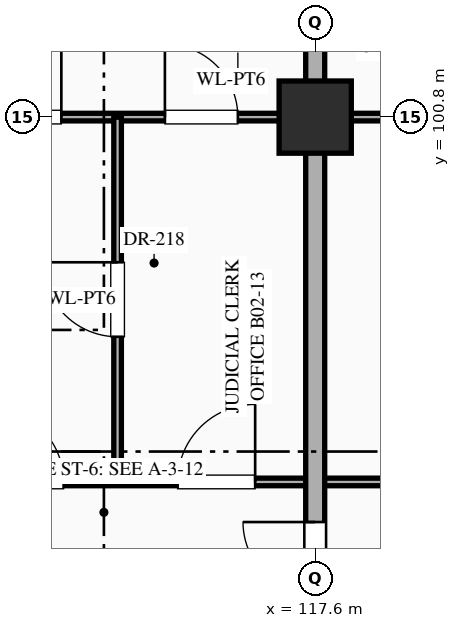
"""IFC4 building model, lengths in metres.
Left out: names, types, materials, properties, quantities, classifications, styles, units other than length and angle.
Written with IfcOpenShell. Run it as: python <this file> out.ifc"""

import sys

from ifc_helpers import new_model, si_unit, direction, frame, frame_2d, origin, origin_2d, place, context, subcontext, project, spatial, rectangle, extrude, element, fill, save


model = new_model("IFC4")
c1 = context("Model", 3, precision=1e-05, world=origin(), true_north=direction((0.0, 1.0)))
c2 = subcontext(c1, "Body", "Model", "MODEL_VIEW")
j1 = project(units=[si_unit("LENGTHUNIT", "METRE"), si_unit("PLANEANGLEUNIT", "RADIAN")], contexts=[c1])
p1 = place(None, origin())
s1 = spatial("IfcSite", under=j1, at=p1, CompositionType="ELEMENT")
p2 = place(p1, origin())
s2 = spatial("IfcBuilding", under=s1, at=p2, CompositionType="ELEMENT")
p3 = place(p2, frame((0.0, 0.0, -10.2)))
s3 = spatial("IfcBuildingStorey", under=s2, at=p3, CompositionType="ELEMENT", Elevation=-10.2)
p4 = place(p3, frame((117.6, 100.8, 0.0), z_axis=(0.0, 0.0, 1.0), x_axis=(1.0, 0.0, 0.0)))
e1 = element("IfcColumn", 1, at=p4, inside=s3, PredefinedType="COLUMN", context=c2, shape_type="SweptSolid", body=[
    extrude(rectangle(XDim=0.95, YDim=0.95, at=origin_2d()), origin(), (0.0, 0.0, 1.0), 4.8),
])
p5 = place(p3, frame((0.04, 96.0, 0.0), z_axis=(0.0, 0.0, 1.0), x_axis=(1.0, 0.0, 0.0)))
e2 = element("IfcWall", 2, at=p5, inside=s3, PredefinedType="STANDARD", context=c2, shape_type="SweptSolid", body=[
    extrude(rectangle(XDim=151.16, YDim=0.1, at=frame_2d((75.58, 0.0))), origin(), (0.0, 0.0, 1.0), 4.48),
])
p6 = place(p5, frame((1.04, 0.0, 0.0)))
e3 = element("IfcOpeningElement", 3, at=p6, cuts=e2, PredefinedType="OPENING", context=c2, shape_type="SweptSolid", body=[
    extrude(rectangle(XDim=1.28, YDim=2.35, at=frame_2d((0.64, 1.175))), frame((0.0, 0.062, 0.0), z_axis=(0.0, -1.0, 0.0), x_axis=(1.0, 0.0, 0.0)), (0.0, 0.0, 1.0), 0.124),
])
p7 = place(p5, frame((4.09, 0.0, 0.0)))
e4 = element("IfcOpeningElement", 4, at=p7, cuts=e2, PredefinedType="OPENING", context=c2, shape_type="SweptSolid", body=[
    extrude(rectangle(XDim=0.94, YDim=2.3, at=frame_2d((0.47, 1.15))), frame((0.0, 0.062, 0.0), z_axis=(0.0, -1.0, 0.0), x_axis=(1.0, 0.0, 0.0)), (0.0, 0.0, 1.0), 0.124),
])
p8 = place(p5, frame((6.57, 0.0, 0.0)))
e5 = element("IfcOpeningElement", 5, at=p8, cuts=e2, PredefinedType="OPENING", context=c2, shape_type="SweptSolid", body=[
    extrude(rectangle(XDim=0.98, YDim=2.35, at=frame_2d((0.49, 1.175))), frame((0.0, 0.062, 0.0), z_axis=(0.0, -1.0, 0.0), x_axis=(1.0, 0.0, 0.0)), (0.0, 0.0, 1.0), 0.124),
])
p9 = place(p5, frame((12.05, 0.0, 0.0)))
e6 = element("IfcOpeningElement", 6, at=p9, cuts=e2, PredefinedType="OPENING", context=c2, shape_type="SweptSolid", body=[
    extrude(rectangle(XDim=1.02, YDim=2.4, at=frame_2d((0.51, 1.2))), frame((0.0, 0.062, 0.0), z_axis=(0.0, -1.0, 0.0), x_axis=(1.0, 0.0, 0.0)), (0.0, 0.0, 1.0), 0.124),
])
p10 = place(p5, frame((20.43, 0.0, 0.0)))
e7 = element("IfcOpeningElement", 7, at=p10, cuts=e2, PredefinedType="OPENING", context=c2, shape_type="SweptSolid", body=[
    extrude(rectangle(XDim=1.06, YDim=2.4, at=frame_2d((0.53, 1.2))), frame((0.0, 0.062, 0.0), z_axis=(0.0, -1.0, 0.0), x_axis=(1.0, 0.0, 0.0)), (0.0, 0.0, 1.0), 0.124),
])
p11 = place(p5, frame((26.29, 0.0, 0.0)))
e8 = element("IfcOpeningElement", 8, at=p11, cuts=e2, PredefinedType="OPENING", context=c2, shape_type="SweptSolid", body=[
    extrude(rectangle(XDim=1.14, YDim=2.4, at=frame_2d((0.57, 1.2))), frame((0.0, 0.062, 0.0), z_axis=(0.0, -1.0, 0.0), x_axis=(1.0, 0.0, 0.0)), (0.0, 0.0, 1.0), 0.124),
])
p12 = place(p5, frame((29.31, 0.0, 0.0)))
e9 = element("IfcOpeningElement", 9, at=p12, cuts=e2, PredefinedType="OPENING", context=c2, shape_type="SweptSolid", body=[
    extrude(rectangle(XDim=0.9, YDim=2.15, at=frame_2d((0.45, 1.075))), frame((0.0, 0.062, 0.0), z_axis=(0.0, -1.0, 0.0), x_axis=(1.0, 0.0, 0.0)), (0.0, 0.0, 1.0), 0.124),
])
p13 = place(p5, frame((31.83, 0.0, 0.0)))
e10 = element("IfcOpeningElement", 10, at=p13, cuts=e2, PredefinedType="OPENING", context=c2, shape_type="SweptSolid", body=[
    extrude(rectangle(XDim=0.86, YDim=2.1, at=frame_2d((0.43, 1.05))), frame((0.0, 0.062, 0.0), z_axis=(0.0, -1.0, 0.0), x_axis=(1.0, 0.0, 0.0)), (0.0, 0.0, 1.0), 0.124),
])
p14 = place(p5, frame((37.3, 0.0, 0.0)))
e11 = element("IfcOpeningElement", 11, at=p14, cuts=e2, PredefinedType="OPENING", context=c2, shape_type="SweptSolid", body=[
    extrude(rectangle(XDim=0.92, YDim=2.15, at=frame_2d((0.46, 1.075))), frame((0.0, 0.062, 0.0), z_axis=(0.0, -1.0, 0.0), x_axis=(1.0, 0.0, 0.0)), (0.0, 0.0, 1.0), 0.124),
])
p15 = place(p5, frame((45.68, 0.0, 0.0)))
e12 = element("IfcOpeningElement", 12, at=p15, cuts=e2, PredefinedType="OPENING", context=c2, shape_type="SweptSolid", body=[
    extrude(rectangle(XDim=0.96, YDim=2.2, at=frame_2d((0.48, 1.1))), frame((0.0, 0.062, 0.0), z_axis=(0.0, -1.0, 0.0), x_axis=(1.0, 0.0, 0.0)), (0.0, 0.0, 1.0), 0.124),
])
p16 = place(p5, frame((51.57, 0.0, 0.0)))
e13 = element("IfcOpeningElement", 13, at=p16, cuts=e2, PredefinedType="OPENING", context=c2, shape_type="SweptSolid", body=[
    extrude(rectangle(XDim=0.98, YDim=2.35, at=frame_2d((0.49, 1.175))), frame((0.0, 0.062, 0.0), z_axis=(0.0, -1.0, 0.0), x_axis=(1.0, 0.0, 0.0)), (0.0, 0.0, 1.0), 0.124),
])
p17 = place(p5, frame((54.45, 0.0, 0.0)))
e14 = element("IfcOpeningElement", 14, at=p17, cuts=e2, PredefinedType="OPENING", context=c2, shape_type="SweptSolid", body=[
    extrude(rectangle(XDim=1.02, YDim=2.4, at=frame_2d((0.51, 1.2))), frame((0.0, 0.062, 0.0), z_axis=(0.0, -1.0, 0.0), x_axis=(1.0, 0.0, 0.0)), (0.0, 0.0, 1.0), 0.124),
])
p18 = place(p5, frame((56.93, 0.0, 0.0)))
e15 = element("IfcOpeningElement", 15, at=p18, cuts=e2, PredefinedType="OPENING", context=c2, shape_type="SweptSolid", body=[
    extrude(rectangle(XDim=1.06, YDim=2.4, at=frame_2d((0.53, 1.2))), frame((0.0, 0.062, 0.0), z_axis=(0.0, -1.0, 0.0), x_axis=(1.0, 0.0, 0.0)), (0.0, 0.0, 1.0), 0.124),
])
p19 = place(p5, frame((62.39, 0.0, 0.0)))
e16 = element("IfcOpeningElement", 16, at=p19, cuts=e2, PredefinedType="OPENING", context=c2, shape_type="SweptSolid", body=[
    extrude(rectangle(XDim=1.14, YDim=2.4, at=frame_2d((0.57, 1.2))), frame((0.0, 0.062, 0.0), z_axis=(0.0, -1.0, 0.0), x_axis=(1.0, 0.0, 0.0)), (0.0, 0.0, 1.0), 0.124),
])
p20 = place(p5, frame((70.91, 0.0, 0.0)))
e17 = element("IfcOpeningElement", 17, at=p20, cuts=e2, PredefinedType="OPENING", context=c2, shape_type="SweptSolid", body=[
    extrude(rectangle(XDim=0.9, YDim=2.15, at=frame_2d((0.45, 1.075))), frame((0.0, 0.062, 0.0), z_axis=(0.0, -1.0, 0.0), x_axis=(1.0, 0.0, 0.0)), (0.0, 0.0, 1.0), 0.124),
])
p21 = place(p5, frame((79.33, 0.0, 0.0)))
e18 = element("IfcOpeningElement", 18, at=p21, cuts=e2, PredefinedType="OPENING", context=c2, shape_type="SweptSolid", body=[
    extrude(rectangle(XDim=0.86, YDim=2.1, at=frame_2d((0.43, 1.05))), frame((0.0, 0.062, 0.0), z_axis=(0.0, -1.0, 0.0), x_axis=(1.0, 0.0, 0.0)), (0.0, 0.0, 1.0), 0.124),
])
p22 = place(p5, frame((85.1, 0.0, 0.0)))
e19 = element("IfcOpeningElement", 19, at=p22, cuts=e2, PredefinedType="OPENING", context=c2, shape_type="SweptSolid", body=[
    extrude(rectangle(XDim=1.12, YDim=2.25, at=frame_2d((0.56, 1.125))), frame((0.0, 0.062, 0.0), z_axis=(0.0, -1.0, 0.0), x_axis=(1.0, 0.0, 0.0)), (0.0, 0.0, 1.0), 0.124),
])
p23 = place(p5, frame((87.98, 0.0, 0.0)))
e20 = element("IfcOpeningElement", 20, at=p23, cuts=e2, PredefinedType="OPENING", context=c2, shape_type="SweptSolid", body=[
    extrude(rectangle(XDim=1.16, YDim=2.3, at=frame_2d((0.58, 1.15))), frame((0.0, 0.062, 0.0), z_axis=(0.0, -1.0, 0.0), x_axis=(1.0, 0.0, 0.0)), (0.0, 0.0, 1.0), 0.124),
])
p24 = place(p5, frame((90.46, 0.0, 0.0)))
e21 = element("IfcOpeningElement", 21, at=p24, cuts=e2, PredefinedType="OPENING", context=c2, shape_type="SweptSolid", body=[
    extrude(rectangle(XDim=1.2, YDim=2.35, at=frame_2d((0.6, 1.175))), frame((0.0, 0.062, 0.0), z_axis=(0.0, -1.0, 0.0), x_axis=(1.0, 0.0, 0.0)), (0.0, 0.0, 1.0), 0.124),
])
p25 = place(p5, frame((95.94, 0.0, 0.0)))
e22 = element("IfcOpeningElement", 22, at=p25, cuts=e2, PredefinedType="OPENING", context=c2, shape_type="SweptSolid", body=[
    extrude(rectangle(XDim=1.24, YDim=2.3, at=frame_2d((0.62, 1.15))), frame((0.0, 0.062, 0.0), z_axis=(0.0, -1.0, 0.0), x_axis=(1.0, 0.0, 0.0)), (0.0, 0.0, 1.0), 0.124),
])
p26 = place(p5, frame((104.32, 0.0, 0.0)))
e23 = element("IfcOpeningElement", 23, at=p26, cuts=e2, PredefinedType="OPENING", context=c2, shape_type="SweptSolid", body=[
    extrude(rectangle(XDim=1.28, YDim=2.35, at=frame_2d((0.64, 1.175))), frame((0.0, 0.062, 0.0), z_axis=(0.0, -1.0, 0.0), x_axis=(1.0, 0.0, 0.0)), (0.0, 0.0, 1.0), 0.124),
])
p27 = place(p5, frame((110.39, 0.0, 0.0)))
e24 = element("IfcOpeningElement", 24, at=p27, cuts=e2, PredefinedType="OPENING", context=c2, shape_type="SweptSolid", body=[
    extrude(rectangle(XDim=0.94, YDim=2.3, at=frame_2d((0.47, 1.15))), frame((0.0, 0.062, 0.0), z_axis=(0.0, -1.0, 0.0), x_axis=(1.0, 0.0, 0.0)), (0.0, 0.0, 1.0), 0.124),
])
p28 = place(p5, frame((113.27, 0.0, 0.0)))
e25 = element("IfcOpeningElement", 25, at=p28, cuts=e2, PredefinedType="OPENING", context=c2, shape_type="SweptSolid", body=[
    extrude(rectangle(XDim=0.98, YDim=2.35, at=frame_2d((0.49, 1.175))), frame((0.0, 0.062, 0.0), z_axis=(0.0, -1.0, 0.0), x_axis=(1.0, 0.0, 0.0)), (0.0, 0.0, 1.0), 0.124),
])
p29 = place(p5, frame((115.75, 0.0, 0.0)))
e26 = element("IfcOpeningElement", 26, at=p29, cuts=e2, PredefinedType="OPENING", context=c2, shape_type="SweptSolid", body=[
    extrude(rectangle(XDim=1.02, YDim=2.4, at=frame_2d((0.51, 1.2))), frame((0.0, 0.062, 0.0), z_axis=(0.0, -1.0, 0.0), x_axis=(1.0, 0.0, 0.0)), (0.0, 0.0, 1.0), 0.124),
])
p30 = place(p5, frame((121.24, 0.0, 0.0)))
e27 = element("IfcOpeningElement", 27, at=p30, cuts=e2, PredefinedType="OPENING", context=c2, shape_type="SweptSolid", body=[
    extrude(rectangle(XDim=1.04, YDim=2.2, at=frame_2d((0.52, 1.1))), frame((0.0, 0.062, 0.0), z_axis=(0.0, -1.0, 0.0), x_axis=(1.0, 0.0, 0.0)), (0.0, 0.0, 1.0), 0.124),
])
p31 = place(p5, frame((129.62, 0.0, 0.0)))
e28 = element("IfcOpeningElement", 28, at=p31, cuts=e2, PredefinedType="OPENING", context=c2, shape_type="SweptSolid", body=[
    extrude(rectangle(XDim=1.08, YDim=2.25, at=frame_2d((0.54, 1.125))), frame((0.0, 0.062, 0.0), z_axis=(0.0, -1.0, 0.0), x_axis=(1.0, 0.0, 0.0)), (0.0, 0.0, 1.0), 0.124),
])
p32 = place(p5, frame((135.5, 0.0, 0.0)))
e29 = element("IfcOpeningElement", 29, at=p32, cuts=e2, PredefinedType="OPENING", context=c2, shape_type="SweptSolid", body=[
    extrude(rectangle(XDim=1.12, YDim=2.25, at=frame_2d((0.56, 1.125))), frame((0.0, 0.062, 0.0), z_axis=(0.0, -1.0, 0.0), x_axis=(1.0, 0.0, 0.0)), (0.0, 0.0, 1.0), 0.124),
])
p33 = place(p5, frame((138.38, 0.0, 0.0)))
e30 = element("IfcOpeningElement", 30, at=p33, cuts=e2, PredefinedType="OPENING", context=c2, shape_type="SweptSolid", body=[
    extrude(rectangle(XDim=1.16, YDim=2.3, at=frame_2d((0.58, 1.15))), frame((0.0, 0.062, 0.0), z_axis=(0.0, -1.0, 0.0), x_axis=(1.0, 0.0, 0.0)), (0.0, 0.0, 1.0), 0.124),
])
p34 = place(p5, frame((140.86, 0.0, 0.0)))
e31 = element("IfcOpeningElement", 31, at=p34, cuts=e2, PredefinedType="OPENING", context=c2, shape_type="SweptSolid", body=[
    extrude(rectangle(XDim=1.2, YDim=2.35, at=frame_2d((0.6, 1.175))), frame((0.0, 0.062, 0.0), z_axis=(0.0, -1.0, 0.0), x_axis=(1.0, 0.0, 0.0)), (0.0, 0.0, 1.0), 0.124),
])
p35 = place(p5, frame((146.34, 0.0, 0.0)))
e32 = element("IfcOpeningElement", 32, at=p35, cuts=e2, PredefinedType="OPENING", context=c2, shape_type="SweptSolid", body=[
    extrude(rectangle(XDim=1.24, YDim=2.3, at=frame_2d((0.62, 1.15))), frame((0.0, 0.062, 0.0), z_axis=(0.0, -1.0, 0.0), x_axis=(1.0, 0.0, 0.0)), (0.0, 0.0, 1.0), 0.124),
])
p36 = place(p3, frame((109.2, 100.8, 0.0), z_axis=(0.0, 0.0, 1.0), x_axis=(1.0, 0.0, 0.0)))
e33 = element("IfcWall", 33, at=p36, inside=s3, PredefinedType="STANDARD", context=c2, shape_type="SweptSolid", body=[
    extrude(rectangle(XDim=12.6, YDim=0.1, at=frame_2d((6.3, 0.0))), origin(), (0.0, 0.0, 1.0), 3.63),
])
p37 = place(p36, frame((10.228, 0.0, 0.0)))
e34 = element("IfcOpeningElement", 34, at=p37, cuts=e33, PredefinedType="OPENING", context=c2, shape_type="SweptSolid", body=[
    extrude(rectangle(XDim=0.94, YDim=2.3, at=frame_2d((0.47, 1.15))), frame((0.0, 0.062, 0.0), z_axis=(0.0, -1.0, 0.0), x_axis=(1.0, 0.0, 0.0)), (0.0, 0.0, 1.0), 0.124),
])
p38 = place(p36, frame((1.468, 0.0, 0.0)))
e35 = element("IfcOpeningElement", 35, at=p38, cuts=e33, PredefinedType="OPENING", context=c2, shape_type="SweptSolid", body=[
    extrude(rectangle(XDim=0.86, YDim=2.1, at=frame_2d((0.43, 1.05))), frame((0.0, 0.062, 0.0), z_axis=(0.0, -1.0, 0.0), x_axis=(1.0, 0.0, 0.0)), (0.0, 0.0, 1.0), 0.124),
])
p39 = place(p36, frame((4.14, 0.0, 0.0)))
e36 = element("IfcOpeningElement", 36, at=p39, cuts=e33, PredefinedType="OPENING", context=c2, shape_type="SweptSolid", body=[
    extrude(rectangle(XDim=0.92, YDim=2.15, at=frame_2d((0.46, 1.075))), frame((0.0, 0.062, 0.0), z_axis=(0.0, -1.0, 0.0), x_axis=(1.0, 0.0, 0.0)), (0.0, 0.0, 1.0), 0.124),
])
p40 = place(p36, frame((6.423, 0.0, 0.0)))
e37 = element("IfcOpeningElement", 37, at=p40, cuts=e33, PredefinedType="OPENING", context=c2, shape_type="SweptSolid", body=[
    extrude(rectangle(XDim=0.96, YDim=2.2, at=frame_2d((0.48, 1.1))), frame((0.0, 0.062, 0.0), z_axis=(0.0, -1.0, 0.0), x_axis=(1.0, 0.0, 0.0)), (0.0, 0.0, 1.0), 0.124),
])
p41 = place(p3, frame((115.0, 96.0, 0.0), z_axis=(0.0, 0.0, 1.0), x_axis=(0.0, 1.0, 0.0)))
e38 = element("IfcWall", 38, at=p41, inside=s3, PredefinedType="STANDARD", context=c2, shape_type="SweptSolid", body=[
    extrude(rectangle(XDim=4.8, YDim=0.1, at=frame_2d((2.4, 0.0))), origin(), (0.0, 0.0, 1.0), 4.48),
])
p42 = place(p41, frame((1.91, 0.0, 0.0)))
e39 = element("IfcOpeningElement", 39, at=p42, cuts=e38, PredefinedType="OPENING", context=c2, shape_type="SweptSolid", body=[
    extrude(rectangle(XDim=0.98, YDim=2.35, at=frame_2d((0.49, 1.175))), frame((0.0, 0.062, 0.0), z_axis=(0.0, -1.0, 0.0), x_axis=(1.0, 0.0, 0.0)), (0.0, 0.0, 1.0), 0.124),
])
p43 = place(p3, frame((117.6, 91.2, 0.0), z_axis=(0.0, 0.0, 1.0), x_axis=(0.0, 1.0, 0.0)))
e40 = element("IfcWall", 40, at=p43, inside=s3, PredefinedType="STANDARD", context=c2, shape_type="SweptSolid", body=[
    extrude(rectangle(XDim=23.96, YDim=0.25, at=frame_2d((11.98, 0.0))), origin(), (0.0, 0.0, 1.0), 3.73),
])
p44 = place(p43, frame((0.452, 0.0, 0.0)))
e41 = element("IfcOpeningElement", 41, at=p44, cuts=e40, PredefinedType="OPENING", context=c2, shape_type="SweptSolid", body=[
    extrude(rectangle(XDim=1.1, YDim=2.2, at=frame_2d((0.55, 1.1))), frame((0.0, 0.137, 0.0), z_axis=(0.0, -1.0, 0.0), x_axis=(1.0, 0.0, 0.0)), (0.0, 0.0, 1.0), 0.274),
])
p45 = place(p43, frame((10.498, 0.0, 0.0)))
e42 = element("IfcOpeningElement", 42, at=p45, cuts=e40, PredefinedType="OPENING", context=c2, shape_type="SweptSolid", body=[
    extrude(rectangle(XDim=1.0, YDim=2.2, at=frame_2d((0.5, 1.1))), frame((0.0, 0.137, 0.0), z_axis=(0.0, -1.0, 0.0), x_axis=(1.0, 0.0, 0.0)), (0.0, 0.0, 1.0), 0.274),
])
p46 = place(p43, frame((3.323, 0.0, 0.0)))
e43 = element("IfcOpeningElement", 43, at=p46, cuts=e40, PredefinedType="OPENING", context=c2, shape_type="SweptSolid", body=[
    extrude(rectangle(XDim=0.95, YDim=2.15, at=frame_2d((0.475, 1.075))), frame((0.0, 0.137, 0.0), z_axis=(0.0, -1.0, 0.0), x_axis=(1.0, 0.0, 0.0)), (0.0, 0.0, 1.0), 0.274),
])
p47 = place(p43, frame((17.698, 0.0, 0.0)))
e44 = element("IfcOpeningElement", 44, at=p47, cuts=e40, PredefinedType="OPENING", context=c2, shape_type="SweptSolid", body=[
    extrude(rectangle(XDim=1.0, YDim=2.2, at=frame_2d((0.5, 1.1))), frame((0.0, 0.137, 0.0), z_axis=(0.0, -1.0, 0.0), x_axis=(1.0, 0.0, 0.0)), (0.0, 0.0, 1.0), 0.274),
])
p48 = place(p39, origin())
e45 = element("IfcDoor", 45, at=p48, inside=s3, OperationType="SINGLE_SWING_RIGHT", PredefinedType="DOOR", context=c2, shape_type="SweptSolid", body=[
    extrude(rectangle(XDim=0.92, YDim=2.15, at=frame_2d((0.46, 1.075))), frame((0.0, 0.025, 0.0), z_axis=(0.0, -1.0, 0.0), x_axis=(1.0, 0.0, 0.0)), (0.0, 0.0, 1.0), 0.05),
])
fill(e36, e45)
p49 = place(p40, origin())
e46 = element("IfcDoor", 46, at=p49, inside=s3, OperationType="SINGLE_SWING_LEFT", PredefinedType="DOOR", context=c2, shape_type="SweptSolid", body=[
    extrude(rectangle(XDim=0.96, YDim=2.2, at=frame_2d((0.48, 1.1))), frame((0.0, 0.025, 0.0), z_axis=(0.0, -1.0, 0.0), x_axis=(1.0, 0.0, 0.0)), (0.0, 0.0, 1.0), 0.05),
])
fill(e37, e46)
p50 = place(p46, origin())
e47 = element("IfcDoor", 47, at=p50, inside=s3, OperationType="SINGLE_SWING_RIGHT", PredefinedType="DOOR", context=c2, shape_type="SweptSolid", body=[
    extrude(rectangle(XDim=0.95, YDim=2.15, at=frame_2d((0.475, 1.075))), frame((0.0, 0.025, 0.0), z_axis=(0.0, -1.0, 0.0), x_axis=(1.0, 0.0, 0.0)), (0.0, 0.0, 1.0), 0.05),
])
fill(e43, e47)
p51 = place(p28, origin())
e48 = element("IfcDoor", 48, at=p51, inside=s3, OperationType="SINGLE_SWING_LEFT", PredefinedType="DOOR", context=c2, shape_type="SweptSolid", body=[
    extrude(rectangle(XDim=0.98, YDim=2.35, at=frame_2d((0.49, 1.175))), frame((0.0, 0.025, 0.0), z_axis=(0.0, -1.0, 0.0), x_axis=(1.0, 0.0, 0.0)), (0.0, 0.0, 1.0), 0.05),
])
fill(e25, e48)
p52 = place(p29, origin())
e49 = element("IfcDoor", 49, at=p52, inside=s3, OperationType="SINGLE_SWING_RIGHT", PredefinedType="DOOR", context=c2, shape_type="SweptSolid", body=[
    extrude(rectangle(XDim=1.02, YDim=2.4, at=frame_2d((0.51, 1.2))), frame((0.0, 0.025, 0.0), z_axis=(0.0, -1.0, 0.0), x_axis=(1.0, 0.0, 0.0)), (0.0, 0.0, 1.0), 0.05),
])
fill(e26, e49)
p53 = place(p42, origin())
e50 = element("IfcDoor", 50, at=p53, inside=s3, OperationType="SINGLE_SWING_RIGHT", PredefinedType="DOOR", context=c2, shape_type="SweptSolid", body=[
    extrude(rectangle(XDim=0.98, YDim=2.35, at=frame_2d((0.49, 1.175))), frame((0.0, 0.025, 0.0), z_axis=(0.0, -1.0, 0.0), x_axis=(1.0, 0.0, 0.0)), (0.0, 0.0, 1.0), 0.05),
])
fill(e39, e50)
save(model, sys.argv[1])
